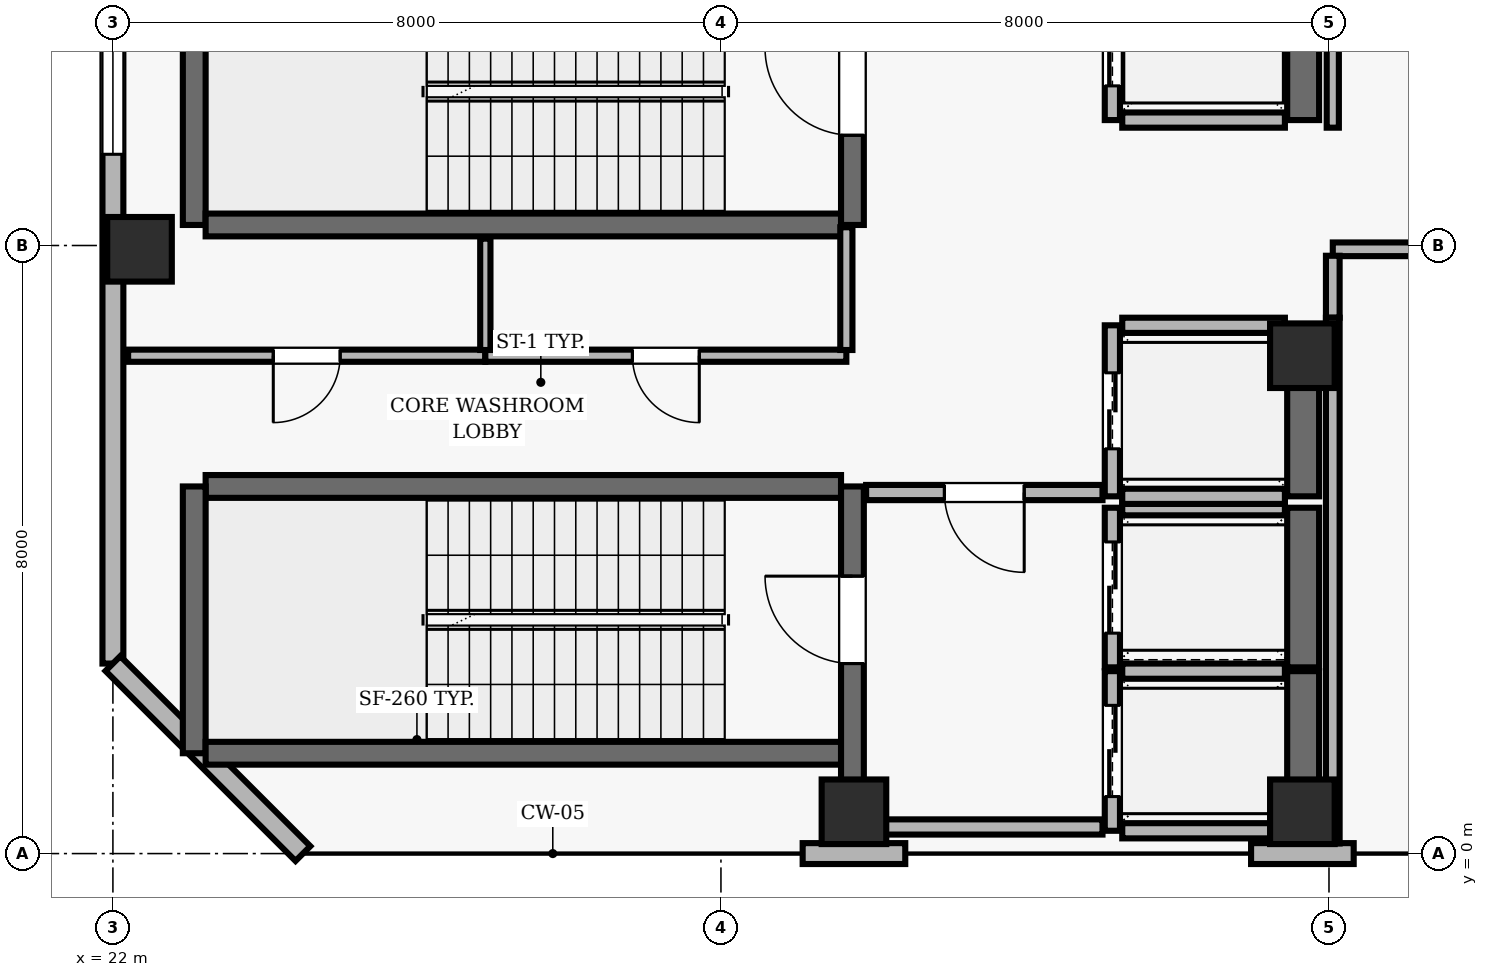
"""IFC4 building model, lengths in metres.
Left out: names, types, materials, properties, quantities, classifications, styles, units other than length and angle.
Written with IfcOpenShell. Run it as: python <this file> out.ifc"""

import sys

from ifc_helpers import new_model, si_unit, direction, frame, frame_2d, origin, origin_2d, place, context, subcontext, project, spatial, rectangle, extrude, element, fill, save


model = new_model("IFC4")
c1 = context("Model", 3, precision=1e-05, world=origin(), true_north=direction((0.0, 1.0)))
c2 = subcontext(c1, "Body", "Model", "MODEL_VIEW")
j1 = project(units=[si_unit("LENGTHUNIT", "METRE"), si_unit("PLANEANGLEUNIT", "RADIAN")], contexts=[c1])
p1 = place(None, origin())
s1 = spatial("IfcSite", under=j1, at=p1, CompositionType="ELEMENT")
p2 = place(p1, origin())
s2 = spatial("IfcBuilding", under=s1, at=p2, CompositionType="ELEMENT")
p3 = place(p2, frame((0.0, 0.0, 243.2)))
s3 = spatial("IfcBuildingStorey", under=s2, at=p3, CompositionType="ELEMENT", Elevation=243.2)
for number, where, z_axis, x_axis in (
    (1, (31.75, 0.55, 0.0), (0.0, 0.0, 1.0), (1.0, 0.0, 0.0)),
    (2, (37.65, 0.55, 0.0), (0.0, 0.0, 1.0), (1.0, 0.0, 0.0)),
    (3, (22.35, 7.95, 0.0), (0.0, 0.0, 1.0), (1.0, 0.0, 0.0)),
    (4, (37.65, 6.55, 0.0), (0.0, 0.0, 1.0), (1.0, 0.0, 0.0)),
):
    element("IfcColumn", number, at=place(p3, frame(where, z_axis=z_axis, x_axis=x_axis)), inside=s3, PredefinedType="COLUMN", context=c2, shape_type="SweptSolid", body=[
        extrude(rectangle(XDim=0.85, YDim=0.85, at=origin_2d()), origin(), (0.0, 0.0, 1.0), 5.0),
    ])
p4 = place(p3, frame((31.075, 0.0, 0.0), z_axis=(0.0, 0.0, 1.0), x_axis=(1.0, 0.0, 0.0)))
e5 = element("IfcWall", 5, at=p4, inside=s3, PredefinedType="SOLIDWALL", context=c2, shape_type="SweptSolid", body=[
    extrude(rectangle(XDim=1.35, YDim=0.275, at=frame_2d((0.675, 0.0))), origin(), (0.0, 0.0, 1.0), 4.79),
])
p5 = place(p3, frame((36.975, 0.0, 0.0), z_axis=(0.0, 0.0, 1.0), x_axis=(1.0, 0.0, 0.0)))
e6 = element("IfcWall", 6, at=p5, inside=s3, PredefinedType="SOLIDWALL", context=c2, shape_type="SweptSolid", body=[
    extrude(rectangle(XDim=1.35, YDim=0.275, at=frame_2d((0.675, 0.0))), origin(), (0.0, 0.0, 1.0), 4.79),
])
p6 = place(p3, frame((22.0, 35.3, 0.0), z_axis=(0.0, 0.0, 1.0), x_axis=(0.0, -1.0, 0.0)))
e7 = element("IfcWall", 7, at=p6, inside=s3, PredefinedType="SOLIDWALL", context=c2, shape_type="SweptSolid", body=[
    extrude(rectangle(XDim=32.8, YDim=0.275, at=frame_2d((16.4, 0.0))), origin(), (0.0, 0.0, 1.0), 4.79),
])
p7 = place(p6, frame((7.3, 0.0, 0.0)))
e8 = element("IfcOpeningElement", 8, at=p7, cuts=e7, PredefinedType="OPENING", context=c2, shape_type="SweptSolid", body=[
    extrude(rectangle(XDim=1.0, YDim=2.2, at=frame_2d((0.5, 1.1))), frame((0.0, 0.147, 0.0), z_axis=(0.0, -1.0, 0.0), x_axis=(1.0, 0.0, 0.0)), (0.0, 0.0, 1.0), 0.295),
])
p8 = place(p6, frame((12.617, 0.0, 0.9)))
e9 = element("IfcOpeningElement", 9, at=p8, cuts=e7, PredefinedType="OPENING", context=c2, shape_type="SweptSolid", body=[
    extrude(rectangle(XDim=3.0, YDim=2.2, at=frame_2d((1.5, 1.1))), frame((0.0, 0.147, 0.0), z_axis=(0.0, -1.0, 0.0), x_axis=(1.0, 0.0, 0.0)), (0.0, 0.0, 1.0), 0.295),
])
p9 = place(p6, frame((23.1, 0.0, 0.9)))
e10 = element("IfcOpeningElement", 10, at=p9, cuts=e7, PredefinedType="OPENING", context=c2, shape_type="SweptSolid", body=[
    extrude(rectangle(XDim=3.0, YDim=2.2, at=frame_2d((1.5, 1.1))), frame((0.0, 0.147, 0.0), z_axis=(0.0, -1.0, 0.0), x_axis=(1.0, 0.0, 0.0)), (0.0, 0.0, 1.0), 0.295),
])
p10 = place(p3, frame((22.0, 2.5, 0.0), z_axis=(0.0, 0.0, 1.0), x_axis=(0.707106781187, -0.707106781187, 0.0)))
e11 = element("IfcWall", 11, at=p10, inside=s3, PredefinedType="SOLIDWALL", context=c2, shape_type="SweptSolid", body=[
    extrude(rectangle(XDim=3.536, YDim=0.275, at=frame_2d((1.768, 0.0))), origin(), (0.0, 0.0, 1.0), 4.79),
])
p11 = place(p3, frame((31.58, 4.83, 0.0), z_axis=(0.0, 0.0, 1.0), x_axis=(-1.0, 0.0, 0.0)))
e12 = element("IfcWall", 12, at=p11, inside=s3, PredefinedType="SHEAR", context=c2, shape_type="SweptSolid", body=[
    extrude(rectangle(XDim=8.36, YDim=0.3, at=frame_2d((4.18, 0.0))), origin(), (0.0, 0.0, 1.0), 4.79),
])
p12 = place(p3, frame((23.07, 4.83, 0.0), z_axis=(0.0, 0.0, 1.0), x_axis=(0.0, -1.0, 0.0)))
e13 = element("IfcWall", 13, at=p12, inside=s3, PredefinedType="SHEAR", context=c2, shape_type="SweptSolid", body=[
    extrude(rectangle(XDim=3.51, YDim=0.3, at=frame_2d((1.755, 0.0))), origin(), (0.0, 0.0, 1.0), 4.79),
])
p13 = place(p3, frame((23.22, 1.32, 0.0), z_axis=(0.0, 0.0, 1.0), x_axis=(1.0, 0.0, 0.0)))
e14 = element("IfcWall", 14, at=p13, inside=s3, PredefinedType="SHEAR", context=c2, shape_type="SweptSolid", body=[
    extrude(rectangle(XDim=8.36, YDim=0.3, at=frame_2d((4.18, 0.0))), origin(), (0.0, 0.0, 1.0), 4.79),
])
p14 = place(p3, frame((31.73, 0.96, 0.0), z_axis=(0.0, 0.0, 1.0), x_axis=(0.0, 1.0, 0.0)))
e15 = element("IfcWall", 15, at=p14, inside=s3, PredefinedType="SHEAR", context=c2, shape_type="SweptSolid", body=[
    extrude(rectangle(XDim=3.87, YDim=0.3, at=frame_2d((1.935, 0.0))), origin(), (0.0, 0.0, 1.0), 4.79),
])
p15 = place(p14, frame((1.54, 0.0, 0.0)))
e16 = element("IfcOpeningElement", 16, at=p15, cuts=e15, PredefinedType="OPENING", context=c2, shape_type="SweptSolid", body=[
    extrude(rectangle(XDim=1.15, YDim=2.15, at=frame_2d((0.575, 1.075))), frame((0.0, 0.16, 0.0), z_axis=(0.0, -1.0, 0.0), x_axis=(1.0, 0.0, 0.0)), (0.0, 0.0, 1.0), 0.32),
])
p16 = place(p3, frame((23.07, 11.78, 0.0), z_axis=(0.0, 0.0, 1.0), x_axis=(0.0, -1.0, 0.0)))
e17 = element("IfcWall", 17, at=p16, inside=s3, PredefinedType="SHEAR", context=c2, shape_type="SweptSolid", body=[
    extrude(rectangle(XDim=3.51, YDim=0.3, at=frame_2d((1.755, 0.0))), origin(), (0.0, 0.0, 1.0), 4.79),
])
p17 = place(p3, frame((23.22, 8.27, 0.0), z_axis=(0.0, 0.0, 1.0), x_axis=(1.0, 0.0, 0.0)))
e18 = element("IfcWall", 18, at=p17, inside=s3, PredefinedType="SHEAR", context=c2, shape_type="SweptSolid", body=[
    extrude(rectangle(XDim=8.36, YDim=0.3, at=frame_2d((4.18, 0.0))), origin(), (0.0, 0.0, 1.0), 4.79),
])
p18 = place(p3, frame((31.73, 8.27, 0.0), z_axis=(0.0, 0.0, 1.0), x_axis=(0.0, 1.0, 0.0)))
e19 = element("IfcWall", 19, at=p18, inside=s3, PredefinedType="SHEAR", context=c2, shape_type="SweptSolid", body=[
    extrude(rectangle(XDim=3.51, YDim=0.3, at=frame_2d((1.755, 0.0))), origin(), (0.0, 0.0, 1.0), 4.79),
])
p19 = place(p18, frame((1.18, 0.0, 0.0)))
e20 = element("IfcOpeningElement", 20, at=p19, cuts=e19, PredefinedType="OPENING", context=c2, shape_type="SweptSolid", body=[
    extrude(rectangle(XDim=1.15, YDim=2.15, at=frame_2d((0.575, 1.075))), frame((0.0, 0.16, 0.0), z_axis=(0.0, -1.0, 0.0), x_axis=(1.0, 0.0, 0.0)), (0.0, 0.0, 1.0), 0.32),
])
p20 = place(p3, frame((35.15, 2.4, 0.0), z_axis=(0.0, 0.0, 1.0), x_axis=(0.0, -1.0, 0.0)))
e21 = element("IfcWall", 21, at=p20, inside=s3, PredefinedType="SOLIDWALL", context=c2, shape_type="SweptSolid", body=[
    extrude(rectangle(XDim=2.1, YDim=0.2, at=frame_2d((1.05, 0.0))), origin(), (0.0, 0.0, 1.0), 4.79),
])
p21 = place(p20, frame((0.45, 0.0, 0.0)))
e22 = element("IfcOpeningElement", 22, at=p21, cuts=e21, PredefinedType="OPENING", context=c2, shape_type="SweptSolid", body=[
    extrude(rectangle(XDim=1.2, YDim=2.15, at=frame_2d((0.6, 1.075))), frame((0.0, 0.11, 0.0), z_axis=(0.0, -1.0, 0.0), x_axis=(1.0, 0.0, 0.0)), (0.0, 0.0, 1.0), 0.22),
])
p22 = place(p3, frame((37.66, 0.3, 0.0), z_axis=(0.0, 0.0, 1.0), x_axis=(0.0, 1.0, 0.0)))
e23 = element("IfcWall", 23, at=p22, inside=s3, PredefinedType="SHEAR", context=c2, shape_type="SweptSolid", body=[
    extrude(rectangle(XDim=2.1, YDim=0.42, at=frame_2d((1.05, 0.0))), origin(), (0.0, 0.0, 1.0), 4.79),
])
for number, where, z_axis, x_axis in (
    (24, (35.28, 0.3, 0.0), (0.0, 0.0, 1.0), (1.0, 0.0, 0.0)),
    (25, (37.42, 2.4, 0.0), (0.0, 0.0, 1.0), (-1.0, 0.0, 0.0)),
):
    element("IfcWall", number, at=place(p3, frame(where, z_axis=z_axis, x_axis=x_axis)), inside=s3, PredefinedType="SOLIDWALL", context=c2, shape_type="SweptSolid", body=[
        extrude(rectangle(XDim=2.14, YDim=0.2, at=frame_2d((1.07, 0.0))), origin(), (0.0, 0.0, 1.0), 4.79),
    ])
p23 = place(p3, frame((35.15, 4.55, 0.0), z_axis=(0.0, 0.0, 1.0), x_axis=(0.0, -1.0, 0.0)))
e26 = element("IfcWall", 26, at=p23, inside=s3, PredefinedType="SOLIDWALL", context=c2, shape_type="SweptSolid", body=[
    extrude(rectangle(XDim=2.1, YDim=0.2, at=frame_2d((1.05, 0.0))), origin(), (0.0, 0.0, 1.0), 4.79),
])
p24 = place(p23, frame((0.45, 0.0, 0.0)))
e27 = element("IfcOpeningElement", 27, at=p24, cuts=e26, PredefinedType="OPENING", context=c2, shape_type="SweptSolid", body=[
    extrude(rectangle(XDim=1.2, YDim=2.15, at=frame_2d((0.6, 1.075))), frame((0.0, 0.11, 0.0), z_axis=(0.0, -1.0, 0.0), x_axis=(1.0, 0.0, 0.0)), (0.0, 0.0, 1.0), 0.22),
])
p25 = place(p3, frame((37.66, 2.45, 0.0), z_axis=(0.0, 0.0, 1.0), x_axis=(0.0, 1.0, 0.0)))
e28 = element("IfcWall", 28, at=p25, inside=s3, PredefinedType="SHEAR", context=c2, shape_type="SweptSolid", body=[
    extrude(rectangle(XDim=2.1, YDim=0.42, at=frame_2d((1.05, 0.0))), origin(), (0.0, 0.0, 1.0), 4.79),
])
p26 = place(p3, frame((37.42, 4.55, 0.0), z_axis=(0.0, 0.0, 1.0), x_axis=(-1.0, 0.0, 0.0)))
e29 = element("IfcWall", 29, at=p26, inside=s3, PredefinedType="SOLIDWALL", context=c2, shape_type="SweptSolid", body=[
    extrude(rectangle(XDim=2.14, YDim=0.2, at=frame_2d((1.07, 0.0))), origin(), (0.0, 0.0, 1.0), 4.79),
])
p27 = place(p3, frame((35.15, 6.95, 0.0), z_axis=(0.0, 0.0, 1.0), x_axis=(0.0, -1.0, 0.0)))
e30 = element("IfcWall", 30, at=p27, inside=s3, PredefinedType="SOLIDWALL", context=c2, shape_type="SweptSolid", body=[
    extrude(rectangle(XDim=2.25, YDim=0.2, at=frame_2d((1.125, 0.0))), origin(), (0.0, 0.0, 1.0), 4.79),
])
p28 = place(p27, frame((0.625, 0.0, 0.0)))
e31 = element("IfcOpeningElement", 31, at=p28, cuts=e30, PredefinedType="OPENING", context=c2, shape_type="SweptSolid", body=[
    extrude(rectangle(XDim=1.0, YDim=2.1, at=frame_2d((0.5, 1.05))), frame((0.0, 0.11, 0.0), z_axis=(0.0, -1.0, 0.0), x_axis=(1.0, 0.0, 0.0)), (0.0, 0.0, 1.0), 0.22),
])
p29 = place(p3, frame((37.66, 4.7, 0.0), z_axis=(0.0, 0.0, 1.0), x_axis=(0.0, 1.0, 0.0)))
e32 = element("IfcWall", 32, at=p29, inside=s3, PredefinedType="SHEAR", context=c2, shape_type="SweptSolid", body=[
    extrude(rectangle(XDim=2.25, YDim=0.42, at=frame_2d((1.125, 0.0))), origin(), (0.0, 0.0, 1.0), 4.79),
])
for number, where, z_axis, x_axis in (
    (33, (35.28, 4.7, 0.0), (0.0, 0.0, 1.0), (1.0, 0.0, 0.0)),
    (34, (37.42, 6.95, 0.0), (0.0, 0.0, 1.0), (-1.0, 0.0, 0.0)),
):
    element("IfcWall", number, at=place(p3, frame(where, z_axis=z_axis, x_axis=x_axis)), inside=s3, PredefinedType="SOLIDWALL", context=c2, shape_type="SweptSolid", body=[
        extrude(rectangle(XDim=2.14, YDim=0.2, at=frame_2d((1.07, 0.0))), origin(), (0.0, 0.0, 1.0), 4.79),
    ])
p30 = place(p3, frame((35.15, 11.55, 0.0), z_axis=(0.0, 0.0, 1.0), x_axis=(0.0, -1.0, 0.0)))
e35 = element("IfcWall", 35, at=p30, inside=s3, PredefinedType="SOLIDWALL", context=c2, shape_type="SweptSolid", body=[
    extrude(rectangle(XDim=1.9, YDim=0.2, at=frame_2d((0.95, 0.0))), origin(), (0.0, 0.0, 1.0), 4.79),
])
p31 = place(p30, frame((0.45, 0.0, 0.0)))
e36 = element("IfcOpeningElement", 36, at=p31, cuts=e35, PredefinedType="OPENING", context=c2, shape_type="SweptSolid", body=[
    extrude(rectangle(XDim=1.0, YDim=2.1, at=frame_2d((0.5, 1.05))), frame((0.0, 0.11, 0.0), z_axis=(0.0, -1.0, 0.0), x_axis=(1.0, 0.0, 0.0)), (0.0, 0.0, 1.0), 0.22),
])
p32 = place(p3, frame((37.66, 9.65, 0.0), z_axis=(0.0, 0.0, 1.0), x_axis=(0.0, 1.0, 0.0)))
e37 = element("IfcWall", 37, at=p32, inside=s3, PredefinedType="SHEAR", context=c2, shape_type="SweptSolid", body=[
    extrude(rectangle(XDim=1.9, YDim=0.42, at=frame_2d((0.95, 0.0))), origin(), (0.0, 0.0, 1.0), 4.79),
])
p33 = place(p3, frame((35.28, 9.65, 0.0), z_axis=(0.0, 0.0, 1.0), x_axis=(1.0, 0.0, 0.0)))
e38 = element("IfcWall", 38, at=p33, inside=s3, PredefinedType="SOLIDWALL", context=c2, shape_type="SweptSolid", body=[
    extrude(rectangle(XDim=2.14, YDim=0.2, at=frame_2d((1.07, 0.0))), origin(), (0.0, 0.0, 1.0), 4.79),
])
p34 = place(p3, frame((26.9, 6.55, 0.0), z_axis=(0.0, 0.0, 1.0), x_axis=(-1.0, 0.0, 0.0)))
e39 = element("IfcWall", 39, at=p34, inside=s3, PredefinedType="PARTITIONING", context=c2, shape_type="SweptSolid", body=[
    extrude(rectangle(XDim=4.7, YDim=0.16, at=frame_2d((2.35, 0.0))), origin(), (0.0, 0.0, 1.0), 4.79),
])
p35 = place(p34, frame((1.91, 0.0, 0.0)))
e40 = element("IfcOpeningElement", 40, at=p35, cuts=e39, PredefinedType="OPENING", context=c2, shape_type="SweptSolid", body=[
    extrude(rectangle(XDim=0.88, YDim=2.1, at=frame_2d((0.44, 1.05))), frame((0.0, 0.09, 0.0), z_axis=(0.0, -1.0, 0.0), x_axis=(1.0, 0.0, 0.0)), (0.0, 0.0, 1.0), 0.18),
])
p36 = place(p3, frame((31.65, 0.35, 0.0), z_axis=(0.0, 0.0, 1.0), x_axis=(1.0, 0.0, 0.0)))
e41 = element("IfcWall", 41, at=p36, inside=s3, PredefinedType="SOLIDWALL", context=c2, shape_type="SweptSolid", body=[
    extrude(rectangle(XDim=3.37, YDim=0.2, at=frame_2d((1.685, 0.0))), origin(), (0.0, 0.0, 1.0), 4.79),
])
p37 = place(p3, frame((31.65, 6.55, 0.0), z_axis=(0.0, 0.0, 1.0), x_axis=(-1.0, 0.0, 0.0)))
e42 = element("IfcWall", 42, at=p37, inside=s3, PredefinedType="PARTITIONING", context=c2, shape_type="SweptSolid", body=[
    extrude(rectangle(XDim=4.75, YDim=0.16, at=frame_2d((2.375, 0.0))), origin(), (0.0, 0.0, 1.0), 4.79),
])
p38 = place(p37, frame((1.935, 0.0, 0.0)))
e43 = element("IfcOpeningElement", 43, at=p38, cuts=e42, PredefinedType="OPENING", context=c2, shape_type="SweptSolid", body=[
    extrude(rectangle(XDim=0.88, YDim=2.1, at=frame_2d((0.44, 1.05))), frame((0.0, 0.09, 0.0), z_axis=(0.0, -1.0, 0.0), x_axis=(1.0, 0.0, 0.0)), (0.0, 0.0, 1.0), 0.18),
])
p39 = place(p3, frame((35.02, 4.75, 0.0), z_axis=(0.0, 0.0, 1.0), x_axis=(-1.0, 0.0, 0.0)))
e44 = element("IfcWall", 44, at=p39, inside=s3, PredefinedType="SOLIDWALL", context=c2, shape_type="SweptSolid", body=[
    extrude(rectangle(XDim=3.11, YDim=0.2, at=frame_2d((1.555, 0.0))), origin(), (0.0, 0.0, 1.0), 4.79),
])
p40 = place(p39, frame((1.03, 0.0, 0.0)))
e45 = element("IfcOpeningElement", 45, at=p40, cuts=e44, PredefinedType="OPENING", context=c2, shape_type="SweptSolid", body=[
    extrude(rectangle(XDim=1.05, YDim=2.15, at=frame_2d((0.525, 1.075))), frame((0.0, 0.11, 0.0), z_axis=(0.0, -1.0, 0.0), x_axis=(1.0, 0.0, 0.0)), (0.0, 0.0, 1.0), 0.22),
])
p41 = place(p3, frame((38.05, 7.95, 0.0), z_axis=(0.0, 0.0, 1.0), x_axis=(1.0, 0.0, 0.0)))
e46 = element("IfcWall", 46, at=p41, inside=s3, PredefinedType="PARTITIONING", context=c2, shape_type="SweptSolid", body=[
    extrude(rectangle(XDim=13.95, YDim=0.18, at=frame_2d((6.975, 0.0))), origin(), (0.0, 0.0, 1.0), 4.327),
])
p42 = place(p41, frame((5.45, 0.0, 0.0)))
e47 = element("IfcOpeningElement", 47, at=p42, cuts=e46, PredefinedType="OPENING", context=c2, shape_type="SweptSolid", body=[
    extrude(rectangle(XDim=0.95, YDim=2.1, at=frame_2d((0.475, 1.05))), frame((0.0, 0.1, 0.0), z_axis=(0.0, -1.0, 0.0), x_axis=(1.0, 0.0, 0.0)), (0.0, 0.0, 1.0), 0.2),
])
p43 = place(p3, frame((26.9, 6.625, 0.0), z_axis=(0.0, 0.0, 1.0), x_axis=(0.0, 1.0, 0.0)))
e48 = element("IfcWall", 48, at=p43, inside=s3, PredefinedType="PARTITIONING", context=c2, shape_type="SweptSolid", body=[
    extrude(rectangle(XDim=1.465, YDim=0.135, at=frame_2d((0.732, 0.0))), origin(), (0.0, 0.0, 1.0), 4.79),
])
p44 = place(p3, frame((31.65, 8.24, 0.0), z_axis=(0.0, 0.0, 1.0), x_axis=(0.0, -1.0, 0.0)))
e49 = element("IfcWall", 49, at=p44, inside=s3, PredefinedType="PARTITIONING", context=c2, shape_type="SweptSolid", body=[
    extrude(rectangle(XDim=1.615, YDim=0.16, at=frame_2d((0.808, 0.0))), origin(), (0.0, 0.0, 1.0), 4.79),
])
p45 = place(p3, frame((38.05, 7.05, 0.0), z_axis=(0.0, 0.0, 1.0), x_axis=(0.0, 1.0, 0.0)))
e50 = element("IfcWall", 50, at=p45, inside=s3, PredefinedType="PARTITIONING", context=c2, shape_type="SweptSolid", body=[
    extrude(rectangle(XDim=0.815, YDim=0.18, at=frame_2d((0.407, 0.0))), origin(), (0.0, 0.0, 1.0), 4.327),
])
p46 = place(p3, frame((38.05, 7.05, 0.0), z_axis=(0.0, 0.0, 1.0), x_axis=(0.0, -1.0, 0.0)))
e51 = element("IfcWall", 51, at=p46, inside=s3, PredefinedType="PARTITIONING", context=c2, shape_type="SweptSolid", body=[
    extrude(rectangle(XDim=6.917, YDim=0.18, at=frame_2d((3.458, 0.0))), origin(), (0.0, 0.0, 1.0), 4.327),
])
p47 = place(p3, frame((38.05, 15.925, 0.0), z_axis=(0.0, 0.0, 1.0), x_axis=(0.0, -1.0, 0.0)))
e52 = element("IfcWall", 52, at=p47, inside=s3, PredefinedType="PARTITIONING", context=c2, shape_type="SweptSolid", body=[
    extrude(rectangle(XDim=6.375, YDim=0.16, at=frame_2d((3.188, 0.0))), origin(), (0.0, 0.0, 1.0), 4.327),
])
p48 = place(p9, origin())
e53 = element("IfcWindow", 53, at=p48, inside=s3, PartitioningType="SINGLE_PANEL", PredefinedType="WINDOW", context=c2, shape_type="SweptSolid", body=[
    extrude(rectangle(XDim=3.0, YDim=2.2, at=frame_2d((1.5, 1.1))), frame((0.0, 0.03, 0.0), z_axis=(0.0, -1.0, 0.0), x_axis=(1.0, 0.0, 0.0)), (0.0, 0.0, 1.0), 0.06),
])
fill(e10, e53)
p49 = place(p15, origin())
e54 = element("IfcDoor", 54, at=p49, inside=s3, OperationType="SINGLE_SWING_RIGHT", PredefinedType="DOOR", context=c2, shape_type="SweptSolid", body=[
    extrude(rectangle(XDim=1.15, YDim=2.15, at=frame_2d((0.575, 1.075))), frame((0.0, 0.025, 0.0), z_axis=(0.0, -1.0, 0.0), x_axis=(1.0, 0.0, 0.0)), (0.0, 0.0, 1.0), 0.05),
])
fill(e16, e54)
p50 = place(p19, origin())
e55 = element("IfcDoor", 55, at=p50, inside=s3, OperationType="SINGLE_SWING_RIGHT", PredefinedType="DOOR", context=c2, shape_type="SweptSolid", body=[
    extrude(rectangle(XDim=1.15, YDim=2.15, at=frame_2d((0.575, 1.075))), frame((0.0, 0.025, 0.0), z_axis=(0.0, -1.0, 0.0), x_axis=(1.0, 0.0, 0.0)), (0.0, 0.0, 1.0), 0.05),
])
fill(e20, e55)
p51 = place(p21, origin())
e56 = element("IfcDoor", 56, at=p51, inside=s3, OperationType="DOUBLE_DOOR_SLIDING", PredefinedType="DOOR", context=c2, shape_type="SweptSolid", body=[
    extrude(rectangle(XDim=1.2, YDim=2.15, at=frame_2d((0.6, 1.075))), frame((0.0, 0.025, 0.0), z_axis=(0.0, -1.0, 0.0), x_axis=(1.0, 0.0, 0.0)), (0.0, 0.0, 1.0), 0.05),
])
fill(e22, e56)
p52 = place(p24, origin())
e57 = element("IfcDoor", 57, at=p52, inside=s3, OperationType="DOUBLE_DOOR_SLIDING", PredefinedType="DOOR", context=c2, shape_type="SweptSolid", body=[
    extrude(rectangle(XDim=1.2, YDim=2.15, at=frame_2d((0.6, 1.075))), frame((0.0, 0.025, 0.0), z_axis=(0.0, -1.0, 0.0), x_axis=(1.0, 0.0, 0.0)), (0.0, 0.0, 1.0), 0.05),
])
fill(e27, e57)
p53 = place(p28, origin())
e58 = element("IfcDoor", 58, at=p53, inside=s3, OperationType="DOUBLE_DOOR_SLIDING", PredefinedType="DOOR", context=c2, shape_type="SweptSolid", body=[
    extrude(rectangle(XDim=1.0, YDim=2.1, at=frame_2d((0.5, 1.05))), frame((0.0, 0.025, 0.0), z_axis=(0.0, -1.0, 0.0), x_axis=(1.0, 0.0, 0.0)), (0.0, 0.0, 1.0), 0.05),
])
fill(e31, e58)
p54 = place(p31, origin())
e59 = element("IfcDoor", 59, at=p54, inside=s3, OperationType="DOUBLE_DOOR_SLIDING", PredefinedType="DOOR", context=c2, shape_type="SweptSolid", body=[
    extrude(rectangle(XDim=1.0, YDim=2.1, at=frame_2d((0.5, 1.05))), frame((0.0, 0.025, 0.0), z_axis=(0.0, -1.0, 0.0), x_axis=(1.0, 0.0, 0.0)), (0.0, 0.0, 1.0), 0.05),
])
fill(e36, e59)
p55 = place(p40, origin())
e60 = element("IfcDoor", 60, at=p55, inside=s3, OperationType="SINGLE_SWING_LEFT", PredefinedType="DOOR", context=c2, shape_type="SweptSolid", body=[
    extrude(rectangle(XDim=1.05, YDim=2.15, at=frame_2d((0.525, 1.075))), frame((0.0, 0.025, 0.0), z_axis=(0.0, -1.0, 0.0), x_axis=(1.0, 0.0, 0.0)), (0.0, 0.0, 1.0), 0.05),
])
fill(e45, e60)
p56 = place(p35, origin())
e61 = element("IfcDoor", 61, at=p56, inside=s3, OperationType="SINGLE_SWING_RIGHT", PredefinedType="DOOR", context=c2, shape_type="SweptSolid", body=[
    extrude(rectangle(XDim=0.88, YDim=2.1, at=frame_2d((0.44, 1.05))), frame((0.0, 0.025, 0.0), z_axis=(0.0, -1.0, 0.0), x_axis=(1.0, 0.0, 0.0)), (0.0, 0.0, 1.0), 0.05),
])
fill(e40, e61)
p57 = place(p38, origin())
e62 = element("IfcDoor", 62, at=p57, inside=s3, OperationType="SINGLE_SWING_LEFT", PredefinedType="DOOR", context=c2, shape_type="SweptSolid", body=[
    extrude(rectangle(XDim=0.88, YDim=2.1, at=frame_2d((0.44, 1.05))), frame((0.0, 0.025, 0.0), z_axis=(0.0, -1.0, 0.0), x_axis=(1.0, 0.0, 0.0)), (0.0, 0.0, 1.0), 0.05),
])
fill(e43, e62)
save(model, sys.argv[1])
